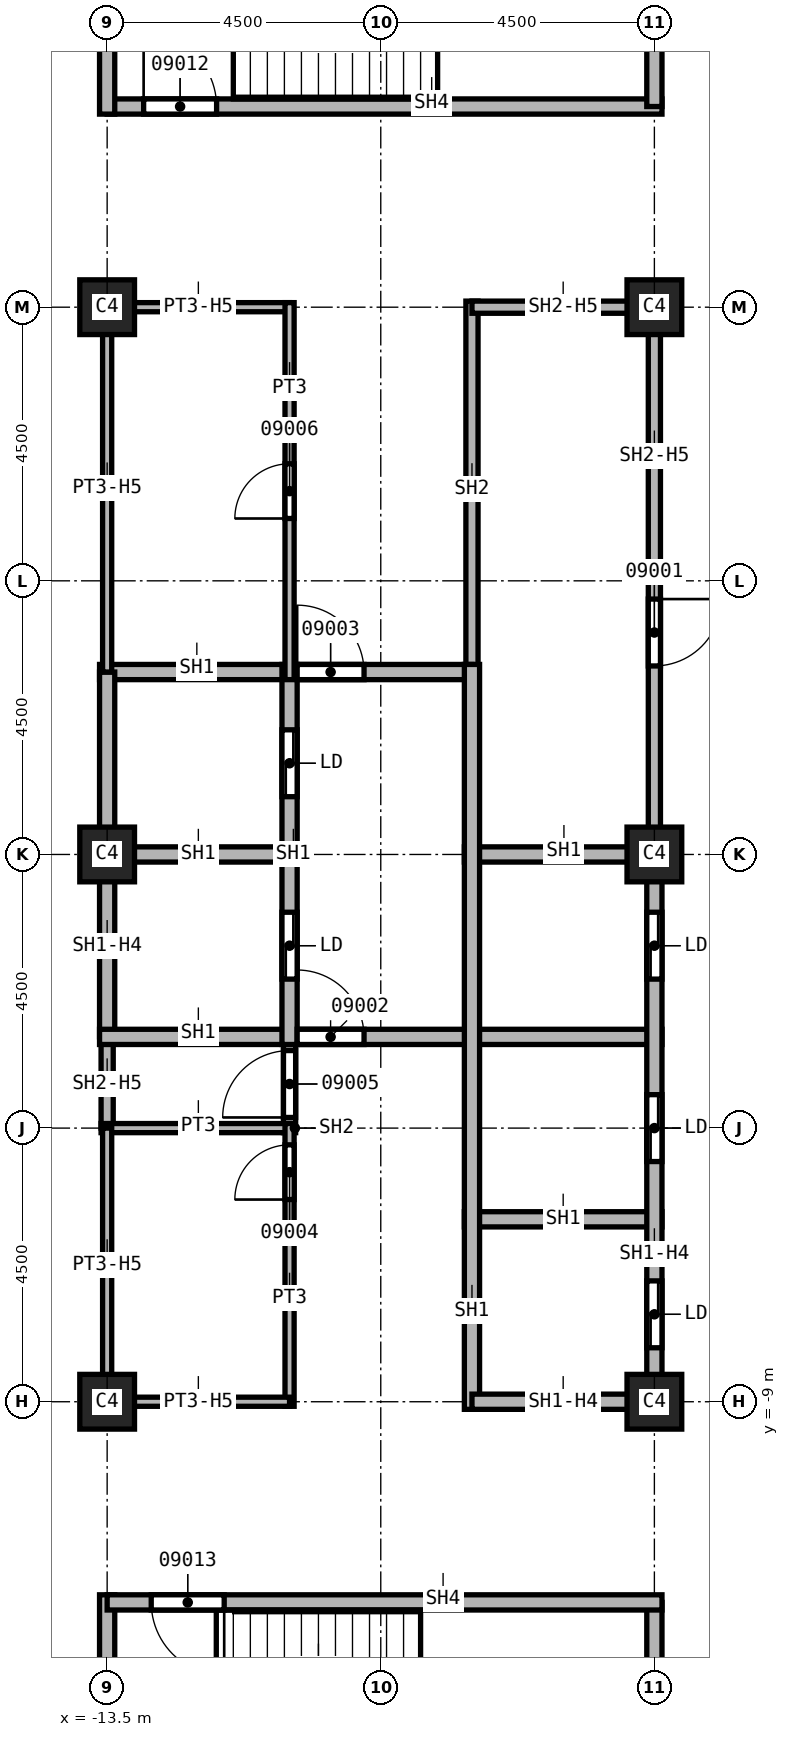
"""IFC4 building model, lengths in metres.
Left out: names, types, materials, properties, quantities, classifications, styles, units other than length and angle.
Written with IfcOpenShell. Run it as: python <this file> out.ifc"""

import sys

from ifc_helpers import new_model, si_unit, direction, frame, frame_2d, origin, origin_2d, place, context, subcontext, project, spatial, rectangle, extrude, element, fill, save


model = new_model("IFC4")
c1 = context("Model", 3, precision=1e-05, world=origin(), true_north=direction((0.0, 1.0)))
c2 = subcontext(c1, "Body", "Model", "MODEL_VIEW")
j1 = project(units=[si_unit("LENGTHUNIT", "METRE"), si_unit("PLANEANGLEUNIT", "RADIAN")], contexts=[c1])
p1 = place(None, origin())
s1 = spatial("IfcSite", under=j1, at=p1, CompositionType="ELEMENT")
p2 = place(p1, origin())
s2 = spatial("IfcBuilding", under=s1, at=p2, CompositionType="ELEMENT")
p3 = place(p2, frame((0.0, 0.0, 162.0)))
s3 = spatial("IfcBuildingStorey", under=s2, at=p3, CompositionType="ELEMENT", Elevation=162.0)
for number, where, z_axis, x_axis in (
    (1, (-4.5, 0.0, 0.0), (0.0, 0.0, 1.0), (1.0, 0.0, 0.0)),
    (2, (-4.5, 9.0, 0.0), (0.0, 0.0, 1.0), (1.0, 0.0, 0.0)),
    (3, (-4.5, -9.0, 0.0), (0.0, 0.0, 1.0), (1.0, 0.0, 0.0)),
    (4, (-13.5, 0.0, 0.0), (0.0, 0.0, 1.0), (1.0, 0.0, 0.0)),
    (5, (-13.5, 9.0, 0.0), (0.0, 0.0, 1.0), (1.0, 0.0, 0.0)),
    (6, (-13.5, -9.0, 0.0), (0.0, 0.0, 1.0), (1.0, 0.0, 0.0)),
):
    element("IfcColumn", number, at=place(p3, frame(where, z_axis=z_axis, x_axis=x_axis)), inside=s3, PredefinedType="COLUMN", context=c2, shape_type="SweptSolid", body=[
        extrude(rectangle(XDim=0.9, YDim=0.9, at=origin_2d()), origin(), (0.0, 0.0, 1.0), 3.7),
    ])
p4 = place(p3, frame((-13.5, -4.5, 0.0), z_axis=(0.0, 0.0, 1.0), x_axis=(0.0, 1.0, 0.0)))
e7 = element("IfcWall", 7, at=p4, inside=s3, PredefinedType="SOLIDWALL", context=c2, shape_type="SweptSolid", body=[
    extrude(rectangle(XDim=1.5, YDim=0.2, at=frame_2d((0.75, 0.0))), origin(), (0.0, 0.0, 1.0), 2.938),
])
p5 = place(p3, frame((-10.5, -4.575, 0.0), z_axis=(0.0, 0.0, 1.0), x_axis=(0.0, 1.0, 0.0)))
e8 = element("IfcWall", 8, at=p5, inside=s3, PredefinedType="SOLIDWALL", context=c2, shape_type="SweptSolid", body=[
    extrude(rectangle(XDim=1.7, YDim=0.2, at=frame_2d((0.85, 0.0))), origin(), (0.0, 0.0, 1.0), 3.7),
])
p6 = place(p5, frame((0.25, 0.0, 0.0)))
e9 = element("IfcOpeningElement", 9, at=p6, cuts=e8, PredefinedType="OPENING", context=c2, shape_type="SweptSolid", body=[
    extrude(rectangle(XDim=1.1, YDim=2.1, at=frame_2d((0.55, 1.05))), frame((0.0, 0.1, 0.0), z_axis=(0.0, -1.0, 0.0), x_axis=(1.0, 0.0, 0.0)), (0.0, 0.0, 1.0), 0.2),
])
p7 = place(p3, frame((-7.5, 2.875, 0.0), z_axis=(0.0, 0.0, 1.0), x_axis=(0.0, 1.0, 0.0)))
e10 = element("IfcWall", 10, at=p7, inside=s3, PredefinedType="SOLIDWALL", context=c2, shape_type="SweptSolid", body=[
    extrude(rectangle(XDim=6.225, YDim=0.2, at=frame_2d((3.113, 0.0))), origin(), (0.0, 0.0, 1.0), 3.7),
])
p8 = place(p3, frame((-7.5, 9.0, 0.0), z_axis=(0.0, 0.0, 1.0), x_axis=(1.0, 0.0, 0.0)))
e11 = element("IfcWall", 11, at=p8, inside=s3, PredefinedType="SOLIDWALL", context=c2, shape_type="SweptSolid", body=[
    extrude(rectangle(XDim=3.0, YDim=0.2, at=frame_2d((1.5, 0.0))), origin(), (0.0, 0.0, 1.0), 2.938),
])
p9 = place(p3, frame((-4.5, 9.1, 0.0), z_axis=(0.0, 0.0, 1.0), x_axis=(0.0, -1.0, 0.0)))
e12 = element("IfcWall", 12, at=p9, inside=s3, PredefinedType="SOLIDWALL", context=c2, shape_type="SweptSolid", body=[
    extrude(rectangle(XDim=9.1, YDim=0.2, at=frame_2d((4.55, 0.0))), origin(), (0.0, 0.0, 1.0), 2.938),
])
p10 = place(p9, frame((4.9, 0.0, 0.0)))
e13 = element("IfcOpeningElement", 13, at=p10, cuts=e12, PredefinedType="OPENING", context=c2, shape_type="SweptSolid", body=[
    extrude(rectangle(XDim=1.1, YDim=2.1, at=frame_2d((0.55, 1.05))), frame((0.0, 0.1, 0.0), z_axis=(0.0, -1.0, 0.0), x_axis=(1.0, 0.0, 0.0)), (0.0, 0.0, 1.0), 0.2),
])
p11 = place(p3, frame((-13.625, 0.0, 0.0), z_axis=(0.0, 0.0, 1.0), x_axis=(1.0, 0.0, 0.0)))
e14 = element("IfcWall", 14, at=p11, inside=s3, PredefinedType="SOLIDWALL", context=c2, shape_type="SweptSolid", body=[
    extrude(rectangle(XDim=3.125, YDim=0.25, at=frame_2d((1.562, 0.0))), origin(), (0.0, 0.0, 1.0), 3.7),
])
p12 = place(p3, frame((-13.625, 3.0, 0.0), z_axis=(0.0, 0.0, 1.0), x_axis=(1.0, 0.0, 0.0)))
e15 = element("IfcWall", 15, at=p12, inside=s3, PredefinedType="SOLIDWALL", context=c2, shape_type="SweptSolid", body=[
    extrude(rectangle(XDim=6.125, YDim=0.25, at=frame_2d((3.062, 0.0))), origin(), (0.0, 0.0, 1.0), 3.7),
])
p13 = place(p12, frame((3.25, 0.0, 0.0)))
e16 = element("IfcOpeningElement", 16, at=p13, cuts=e15, PredefinedType="OPENING", context=c2, shape_type="SweptSolid", body=[
    extrude(rectangle(XDim=1.1, YDim=2.1, at=frame_2d((0.55, 1.05))), frame((0.0, 0.125, 0.0), z_axis=(0.0, -1.0, 0.0), x_axis=(1.0, 0.0, 0.0)), (0.0, 0.0, 1.0), 0.25),
])
p14 = place(p3, frame((-13.5, -3.0, 0.0), z_axis=(0.0, 0.0, 1.0), x_axis=(0.0, 1.0, 0.0)))
e17 = element("IfcWall", 17, at=p14, inside=s3, PredefinedType="SOLIDWALL", context=c2, shape_type="SweptSolid", body=[
    extrude(rectangle(XDim=6.0, YDim=0.25, at=frame_2d((3.0, 0.0))), origin(), (0.0, 0.0, 1.0), 2.938),
])
p15 = place(p3, frame((-13.625, -3.0, 0.0), z_axis=(0.0, 0.0, 1.0), x_axis=(1.0, 0.0, 0.0)))
e18 = element("IfcWall", 18, at=p15, inside=s3, PredefinedType="SOLIDWALL", context=c2, shape_type="SweptSolid", body=[
    extrude(rectangle(XDim=9.25, YDim=0.25, at=frame_2d((4.625, 0.0))), origin(), (0.0, 0.0, 1.0), 3.7),
])
p16 = place(p15, frame((3.25, 0.0, 0.0)))
e19 = element("IfcOpeningElement", 19, at=p16, cuts=e18, PredefinedType="OPENING", context=c2, shape_type="SweptSolid", body=[
    extrude(rectangle(XDim=1.1, YDim=2.1, at=frame_2d((0.55, 1.05))), frame((0.0, 0.125, 0.0), z_axis=(0.0, -1.0, 0.0), x_axis=(1.0, 0.0, 0.0)), (0.0, 0.0, 1.0), 0.25),
])
p17 = place(p3, frame((-10.5, -3.125, 0.0), z_axis=(0.0, 0.0, 1.0), x_axis=(0.0, 1.0, 0.0)))
e20 = element("IfcWall", 20, at=p17, inside=s3, PredefinedType="SOLIDWALL", context=c2, shape_type="SweptSolid", body=[
    extrude(rectangle(XDim=6.25, YDim=0.25, at=frame_2d((3.125, 0.0))), origin(), (0.0, 0.0, 1.0), 3.7),
])
p18 = place(p17, frame((1.075, 0.0, 0.0)))
e21 = element("IfcOpeningElement", 21, at=p18, cuts=e20, PredefinedType="OPENING", context=c2, shape_type="SweptSolid", body=[
    extrude(rectangle(XDim=1.1, YDim=2.1, at=frame_2d((0.55, 1.05))), frame((0.0, 0.125, 0.0), z_axis=(0.0, -1.0, 0.0), x_axis=(1.0, 0.0, 0.0)), (0.0, 0.0, 1.0), 0.25),
])
p19 = place(p17, frame((4.075, 0.0, 0.0)))
e22 = element("IfcOpeningElement", 22, at=p19, cuts=e20, PredefinedType="OPENING", context=c2, shape_type="SweptSolid", body=[
    extrude(rectangle(XDim=1.1, YDim=2.1, at=frame_2d((0.55, 1.05))), frame((0.0, 0.125, 0.0), z_axis=(0.0, -1.0, 0.0), x_axis=(1.0, 0.0, 0.0)), (0.0, 0.0, 1.0), 0.25),
])
for number, where, z_axis, x_axis in (
    (23, (-7.625, -6.0, 0.0), (0.0, 0.0, 1.0), (1.0, 0.0, 0.0)),
    (24, (-7.625, 0.0, 0.0), (0.0, 0.0, 1.0), (1.0, 0.0, 0.0)),
):
    element("IfcWall", number, at=place(p3, frame(where, z_axis=z_axis, x_axis=x_axis)), inside=s3, PredefinedType="SOLIDWALL", context=c2, shape_type="SweptSolid", body=[
        extrude(rectangle(XDim=3.25, YDim=0.25, at=frame_2d((1.625, 0.0))), origin(), (0.0, 0.0, 1.0), 3.7),
    ])
p20 = place(p3, frame((-7.5, -9.125, 0.0), z_axis=(0.0, 0.0, 1.0), x_axis=(0.0, 1.0, 0.0)))
e25 = element("IfcWall", 25, at=p20, inside=s3, PredefinedType="SOLIDWALL", context=c2, shape_type="SweptSolid", body=[
    extrude(rectangle(XDim=12.25, YDim=0.25, at=frame_2d((6.125, 0.0))), origin(), (0.0, 0.0, 1.0), 3.7),
])
p21 = place(p3, frame((-4.5, -9.0, 0.0), z_axis=(0.0, 0.0, 1.0), x_axis=(-1.0, 0.0, 0.0)))
e26 = element("IfcWall", 26, at=p21, inside=s3, PredefinedType="SOLIDWALL", context=c2, shape_type="SweptSolid", body=[
    extrude(rectangle(XDim=3.0, YDim=0.25, at=frame_2d((1.5, 0.0))), origin(), (0.0, 0.0, 1.0), 2.938),
])
p22 = place(p3, frame((-4.5, 0.0, 0.0), z_axis=(0.0, 0.0, 1.0), x_axis=(0.0, -1.0, 0.0)))
e27 = element("IfcWall", 27, at=p22, inside=s3, PredefinedType="SOLIDWALL", context=c2, shape_type="SweptSolid", body=[
    extrude(rectangle(XDim=9.125, YDim=0.25, at=frame_2d((4.562, 0.0))), origin(), (0.0, 0.0, 1.0), 2.938),
])
p23 = place(p22, frame((7.012, 0.0, 0.0)))
e28 = element("IfcOpeningElement", 28, at=p23, cuts=e27, PredefinedType="OPENING", context=c2, shape_type="SweptSolid", body=[
    extrude(rectangle(XDim=1.1, YDim=2.1, at=frame_2d((0.55, 1.05))), frame((0.0, 0.125, 0.0), z_axis=(0.0, -1.0, 0.0), x_axis=(1.0, 0.0, 0.0)), (0.0, 0.0, 1.0), 0.25),
])
p24 = place(p22, frame((3.95, 0.0, 0.0)))
e29 = element("IfcOpeningElement", 29, at=p24, cuts=e27, PredefinedType="OPENING", context=c2, shape_type="SweptSolid", body=[
    extrude(rectangle(XDim=1.1, YDim=2.1, at=frame_2d((0.55, 1.05))), frame((0.0, 0.125, 0.0), z_axis=(0.0, -1.0, 0.0), x_axis=(1.0, 0.0, 0.0)), (0.0, 0.0, 1.0), 0.25),
])
p25 = place(p22, frame((0.95, 0.0, 0.0)))
e30 = element("IfcOpeningElement", 30, at=p25, cuts=e27, PredefinedType="OPENING", context=c2, shape_type="SweptSolid", body=[
    extrude(rectangle(XDim=1.1, YDim=2.1, at=frame_2d((0.55, 1.05))), frame((0.0, 0.125, 0.0), z_axis=(0.0, -1.0, 0.0), x_axis=(1.0, 0.0, 0.0)), (0.0, 0.0, 1.0), 0.25),
])
p26 = place(p3, frame((-13.5, -12.175, 0.0), z_axis=(0.0, 0.0, 1.0), x_axis=(0.0, -1.0, 0.0)))
e31 = element("IfcWall", 31, at=p26, inside=s3, PredefinedType="SOLIDWALL", context=c2, shape_type="SweptSolid", body=[
    extrude(rectangle(XDim=4.75, YDim=0.25, at=frame_2d((2.375, 0.0))), origin(), (0.0, 0.0, 1.0), 3.7),
])
p27 = place(p3, frame((-13.5, 12.3, 0.0), z_axis=(0.0, 0.0, 1.0), x_axis=(1.0, 0.0, 0.0)))
e32 = element("IfcWall", 32, at=p27, inside=s3, PredefinedType="SOLIDWALL", context=c2, shape_type="SweptSolid", body=[
    extrude(rectangle(XDim=9.125, YDim=0.25, at=frame_2d((4.562, 0.0))), origin(), (0.0, 0.0, 1.0), 3.7),
])
p28 = place(p27, frame((0.6, 0.0, 0.0)))
e33 = element("IfcOpeningElement", 33, at=p28, cuts=e32, PredefinedType="OPENING", context=c2, shape_type="SweptSolid", body=[
    extrude(rectangle(XDim=1.2, YDim=2.1, at=frame_2d((0.6, 1.05))), frame((0.0, 0.125, 0.0), z_axis=(0.0, -1.0, 0.0), x_axis=(1.0, 0.0, 0.0)), (0.0, 0.0, 1.0), 0.25),
])
p29 = place(p3, frame((-13.5, 12.175, 0.0), z_axis=(0.0, 0.0, 1.0), x_axis=(0.0, 1.0, 0.0)))
e34 = element("IfcWall", 34, at=p29, inside=s3, PredefinedType="SOLIDWALL", context=c2, shape_type="SweptSolid", body=[
    extrude(rectangle(XDim=4.75, YDim=0.25, at=frame_2d((2.375, 0.0))), origin(), (0.0, 0.0, 1.0), 3.7),
])
p30 = place(p3, frame((-4.5, -12.3, 0.0), z_axis=(0.0, 0.0, 1.0), x_axis=(0.0, -1.0, 0.0)))
e35 = element("IfcWall", 35, at=p30, inside=s3, PredefinedType="SOLIDWALL", context=c2, shape_type="SweptSolid", body=[
    extrude(rectangle(XDim=4.625, YDim=0.25, at=frame_2d((2.312, 0.0))), origin(), (0.0, 0.0, 1.0), 3.7),
])
p31 = place(p3, frame((-4.5, 16.8, 0.0), z_axis=(0.0, 0.0, 1.0), x_axis=(0.0, -1.0, 0.0)))
e36 = element("IfcWall", 36, at=p31, inside=s3, PredefinedType="SOLIDWALL", context=c2, shape_type="SweptSolid", body=[
    extrude(rectangle(XDim=4.5, YDim=0.25, at=frame_2d((2.25, 0.0))), origin(), (0.0, 0.0, 1.0), 3.7),
])
p32 = place(p3, frame((-4.375, -12.3, 0.0), z_axis=(0.0, 0.0, 1.0), x_axis=(-1.0, 0.0, 0.0)))
e37 = element("IfcWall", 37, at=p32, inside=s3, PredefinedType="SOLIDWALL", context=c2, shape_type="SweptSolid", body=[
    extrude(rectangle(XDim=9.125, YDim=0.25, at=frame_2d((4.562, 0.0))), origin(), (0.0, 0.0, 1.0), 3.7),
])
p33 = place(p32, frame((7.2, 0.0, 0.0)))
e38 = element("IfcOpeningElement", 38, at=p33, cuts=e37, PredefinedType="OPENING", context=c2, shape_type="SweptSolid", body=[
    extrude(rectangle(XDim=1.2, YDim=2.1, at=frame_2d((0.6, 1.05))), frame((0.0, 0.125, 0.0), z_axis=(0.0, -1.0, 0.0), x_axis=(1.0, 0.0, 0.0)), (0.0, 0.0, 1.0), 0.25),
])
p34 = place(p3, frame((-13.6, -4.5, 0.0), z_axis=(0.0, 0.0, 1.0), x_axis=(1.0, 0.0, 0.0)))
e39 = element("IfcWall", 39, at=p34, inside=s3, PredefinedType="PARTITIONING", context=c2, shape_type="SweptSolid", body=[
    extrude(rectangle(XDim=3.1, YDim=0.15, at=frame_2d((1.55, 0.0))), origin(), (0.0, 0.0, 1.0), 3.7),
])
p35 = place(p3, frame((-13.5, -9.075, 0.0), z_axis=(0.0, 0.0, 1.0), x_axis=(0.0, 1.0, 0.0)))
e40 = element("IfcWall", 40, at=p35, inside=s3, PredefinedType="PARTITIONING", context=c2, shape_type="SweptSolid", body=[
    extrude(rectangle(XDim=4.575, YDim=0.15, at=frame_2d((2.288, 0.0))), origin(), (0.0, 0.0, 1.0), 2.938),
])
p36 = place(p3, frame((-13.5, 3.0, 0.0), z_axis=(0.0, 0.0, 1.0), x_axis=(0.0, 1.0, 0.0)))
e41 = element("IfcWall", 41, at=p36, inside=s3, PredefinedType="PARTITIONING", context=c2, shape_type="SweptSolid", body=[
    extrude(rectangle(XDim=6.075, YDim=0.15, at=frame_2d((3.038, 0.0))), origin(), (0.0, 0.0, 1.0), 2.938),
])
p37 = place(p3, frame((-13.5, 9.0, 0.0), z_axis=(0.0, 0.0, 1.0), x_axis=(1.0, 0.0, 0.0)))
e42 = element("IfcWall", 42, at=p37, inside=s3, PredefinedType="PARTITIONING", context=c2, shape_type="SweptSolid", body=[
    extrude(rectangle(XDim=3.0, YDim=0.15, at=frame_2d((1.5, 0.0))), origin(), (0.0, 0.0, 1.0), 2.938),
])
p38 = place(p3, frame((-10.5, -9.075, 0.0), z_axis=(0.0, 0.0, 1.0), x_axis=(0.0, 1.0, 0.0)))
e43 = element("IfcWall", 43, at=p38, inside=s3, PredefinedType="PARTITIONING", context=c2, shape_type="SweptSolid", body=[
    extrude(rectangle(XDim=4.65, YDim=0.15, at=frame_2d((2.325, 0.0))), origin(), (0.0, 0.0, 1.0), 3.7),
])
p39 = place(p38, frame((3.4, 0.0, 0.0)))
e44 = element("IfcOpeningElement", 44, at=p39, cuts=e43, PredefinedType="OPENING", context=c2, shape_type="SweptSolid", body=[
    extrude(rectangle(XDim=0.9, YDim=2.1, at=frame_2d((0.45, 1.05))), frame((0.0, 0.075, 0.0), z_axis=(0.0, -1.0, 0.0), x_axis=(1.0, 0.0, 0.0)), (0.0, 0.0, 1.0), 0.15),
])
p40 = place(p3, frame((-10.5, -9.0, 0.0), z_axis=(0.0, 0.0, 1.0), x_axis=(-1.0, 0.0, 0.0)))
e45 = element("IfcWall", 45, at=p40, inside=s3, PredefinedType="PARTITIONING", context=c2, shape_type="SweptSolid", body=[
    extrude(rectangle(XDim=3.0, YDim=0.15, at=frame_2d((1.5, 0.0))), origin(), (0.0, 0.0, 1.0), 2.938),
])
p41 = place(p3, frame((-10.5, 2.875, 0.0), z_axis=(0.0, 0.0, 1.0), x_axis=(0.0, 1.0, 0.0)))
e46 = element("IfcWall", 46, at=p41, inside=s3, PredefinedType="PARTITIONING", context=c2, shape_type="SweptSolid", body=[
    extrude(rectangle(XDim=6.2, YDim=0.15, at=frame_2d((3.1, 0.0))), origin(), (0.0, 0.0, 1.0), 3.7),
])
p42 = place(p41, frame((2.65, 0.0, 0.0)))
e47 = element("IfcOpeningElement", 47, at=p42, cuts=e46, PredefinedType="OPENING", context=c2, shape_type="SweptSolid", body=[
    extrude(rectangle(XDim=0.9, YDim=2.1, at=frame_2d((0.45, 1.05))), frame((0.0, 0.075, 0.0), z_axis=(0.0, -1.0, 0.0), x_axis=(1.0, 0.0, 0.0)), (0.0, 0.0, 1.0), 0.15),
])
p43 = place(p10, origin())
e48 = element("IfcDoor", 48, at=p43, inside=s3, OperationType="SINGLE_SWING_RIGHT", PredefinedType="DOOR", context=c2, shape_type="SweptSolid", body=[
    extrude(rectangle(XDim=1.1, YDim=2.1, at=frame_2d((0.55, 1.05))), frame((0.0, 0.025, 0.0), z_axis=(0.0, -1.0, 0.0), x_axis=(1.0, 0.0, 0.0)), (0.0, 0.0, 1.0), 0.05),
])
fill(e13, e48)
p44 = place(p16, origin())
e49 = element("IfcDoor", 49, at=p44, inside=s3, OperationType="SINGLE_SWING_LEFT", PredefinedType="DOOR", context=c2, shape_type="SweptSolid", body=[
    extrude(rectangle(XDim=1.1, YDim=2.1, at=frame_2d((0.55, 1.05))), frame((0.0, 0.025, 0.0), z_axis=(0.0, -1.0, 0.0), x_axis=(1.0, 0.0, 0.0)), (0.0, 0.0, 1.0), 0.05),
])
fill(e19, e49)
p45 = place(p13, origin())
e50 = element("IfcDoor", 50, at=p45, inside=s3, OperationType="SINGLE_SWING_RIGHT", PredefinedType="DOOR", context=c2, shape_type="SweptSolid", body=[
    extrude(rectangle(XDim=1.1, YDim=2.1, at=frame_2d((0.55, 1.05))), frame((0.0, 0.025, 0.0), z_axis=(0.0, -1.0, 0.0), x_axis=(1.0, 0.0, 0.0)), (0.0, 0.0, 1.0), 0.05),
])
fill(e16, e50)
p46 = place(p39, origin())
e51 = element("IfcDoor", 51, at=p46, inside=s3, OperationType="SINGLE_SWING_LEFT", PredefinedType="DOOR", context=c2, shape_type="SweptSolid", body=[
    extrude(rectangle(XDim=0.9, YDim=2.1, at=frame_2d((0.45, 1.05))), frame((0.0, 0.025, 0.0), z_axis=(0.0, -1.0, 0.0), x_axis=(1.0, 0.0, 0.0)), (0.0, 0.0, 1.0), 0.05),
])
fill(e44, e51)
p47 = place(p6, origin())
e52 = element("IfcDoor", 52, at=p47, inside=s3, OperationType="SINGLE_SWING_RIGHT", PredefinedType="DOOR", context=c2, shape_type="SweptSolid", body=[
    extrude(rectangle(XDim=1.1, YDim=2.1, at=frame_2d((0.55, 1.05))), frame((0.0, 0.025, 0.0), z_axis=(0.0, -1.0, 0.0), x_axis=(1.0, 0.0, 0.0)), (0.0, 0.0, 1.0), 0.05),
])
fill(e9, e52)
p48 = place(p42, origin())
e53 = element("IfcDoor", 53, at=p48, inside=s3, OperationType="SINGLE_SWING_LEFT", PredefinedType="DOOR", context=c2, shape_type="SweptSolid", body=[
    extrude(rectangle(XDim=0.9, YDim=2.1, at=frame_2d((0.45, 1.05))), frame((0.0, 0.025, 0.0), z_axis=(0.0, -1.0, 0.0), x_axis=(1.0, 0.0, 0.0)), (0.0, 0.0, 1.0), 0.05),
])
fill(e47, e53)
p49 = place(p28, origin())
e54 = element("IfcDoor", 54, at=p49, inside=s3, OperationType="SINGLE_SWING_LEFT", PredefinedType="DOOR", context=c2, shape_type="SweptSolid", body=[
    extrude(rectangle(XDim=1.2, YDim=2.1, at=frame_2d((0.6, 1.05))), frame((0.0, 0.025, 0.0), z_axis=(0.0, -1.0, 0.0), x_axis=(1.0, 0.0, 0.0)), (0.0, 0.0, 1.0), 0.05),
])
fill(e33, e54)
p50 = place(p33, origin())
e55 = element("IfcDoor", 55, at=p50, inside=s3, OperationType="SINGLE_SWING_RIGHT", PredefinedType="DOOR", context=c2, shape_type="SweptSolid", body=[
    extrude(rectangle(XDim=1.2, YDim=2.1, at=frame_2d((0.6, 1.05))), frame((0.0, 0.025, 0.0), z_axis=(0.0, -1.0, 0.0), x_axis=(1.0, 0.0, 0.0)), (0.0, 0.0, 1.0), 0.05),
])
fill(e38, e55)
p51 = place(p23, origin())
e56 = element("IfcDoor", 56, at=p51, inside=s3, OperationType="SLIDING_TO_LEFT", PredefinedType="DOOR", context=c2, shape_type="SweptSolid", body=[
    extrude(rectangle(XDim=1.1, YDim=2.1, at=frame_2d((0.55, 1.05))), frame((0.0, 0.025, 0.0), z_axis=(0.0, -1.0, 0.0), x_axis=(1.0, 0.0, 0.0)), (0.0, 0.0, 1.0), 0.05),
])
fill(e28, e56)
p52 = place(p24, origin())
e57 = element("IfcDoor", 57, at=p52, inside=s3, OperationType="SLIDING_TO_LEFT", PredefinedType="DOOR", context=c2, shape_type="SweptSolid", body=[
    extrude(rectangle(XDim=1.1, YDim=2.1, at=frame_2d((0.55, 1.05))), frame((0.0, 0.025, 0.0), z_axis=(0.0, -1.0, 0.0), x_axis=(1.0, 0.0, 0.0)), (0.0, 0.0, 1.0), 0.05),
])
fill(e29, e57)
p53 = place(p25, origin())
e58 = element("IfcDoor", 58, at=p53, inside=s3, OperationType="SLIDING_TO_LEFT", PredefinedType="DOOR", context=c2, shape_type="SweptSolid", body=[
    extrude(rectangle(XDim=1.1, YDim=2.1, at=frame_2d((0.55, 1.05))), frame((0.0, 0.025, 0.0), z_axis=(0.0, -1.0, 0.0), x_axis=(1.0, 0.0, 0.0)), (0.0, 0.0, 1.0), 0.05),
])
fill(e30, e58)
p54 = place(p18, origin())
e59 = element("IfcDoor", 59, at=p54, inside=s3, OperationType="SLIDING_TO_LEFT", PredefinedType="DOOR", context=c2, shape_type="SweptSolid", body=[
    extrude(rectangle(XDim=1.1, YDim=2.1, at=frame_2d((0.55, 1.05))), frame((0.0, 0.025, 0.0), z_axis=(0.0, -1.0, 0.0), x_axis=(1.0, 0.0, 0.0)), (0.0, 0.0, 1.0), 0.05),
])
fill(e21, e59)
p55 = place(p19, origin())
e60 = element("IfcDoor", 60, at=p55, inside=s3, OperationType="SLIDING_TO_LEFT", PredefinedType="DOOR", context=c2, shape_type="SweptSolid", body=[
    extrude(rectangle(XDim=1.1, YDim=2.1, at=frame_2d((0.55, 1.05))), frame((0.0, 0.025, 0.0), z_axis=(0.0, -1.0, 0.0), x_axis=(1.0, 0.0, 0.0)), (0.0, 0.0, 1.0), 0.05),
])
fill(e22, e60)
save(model, sys.argv[1])
